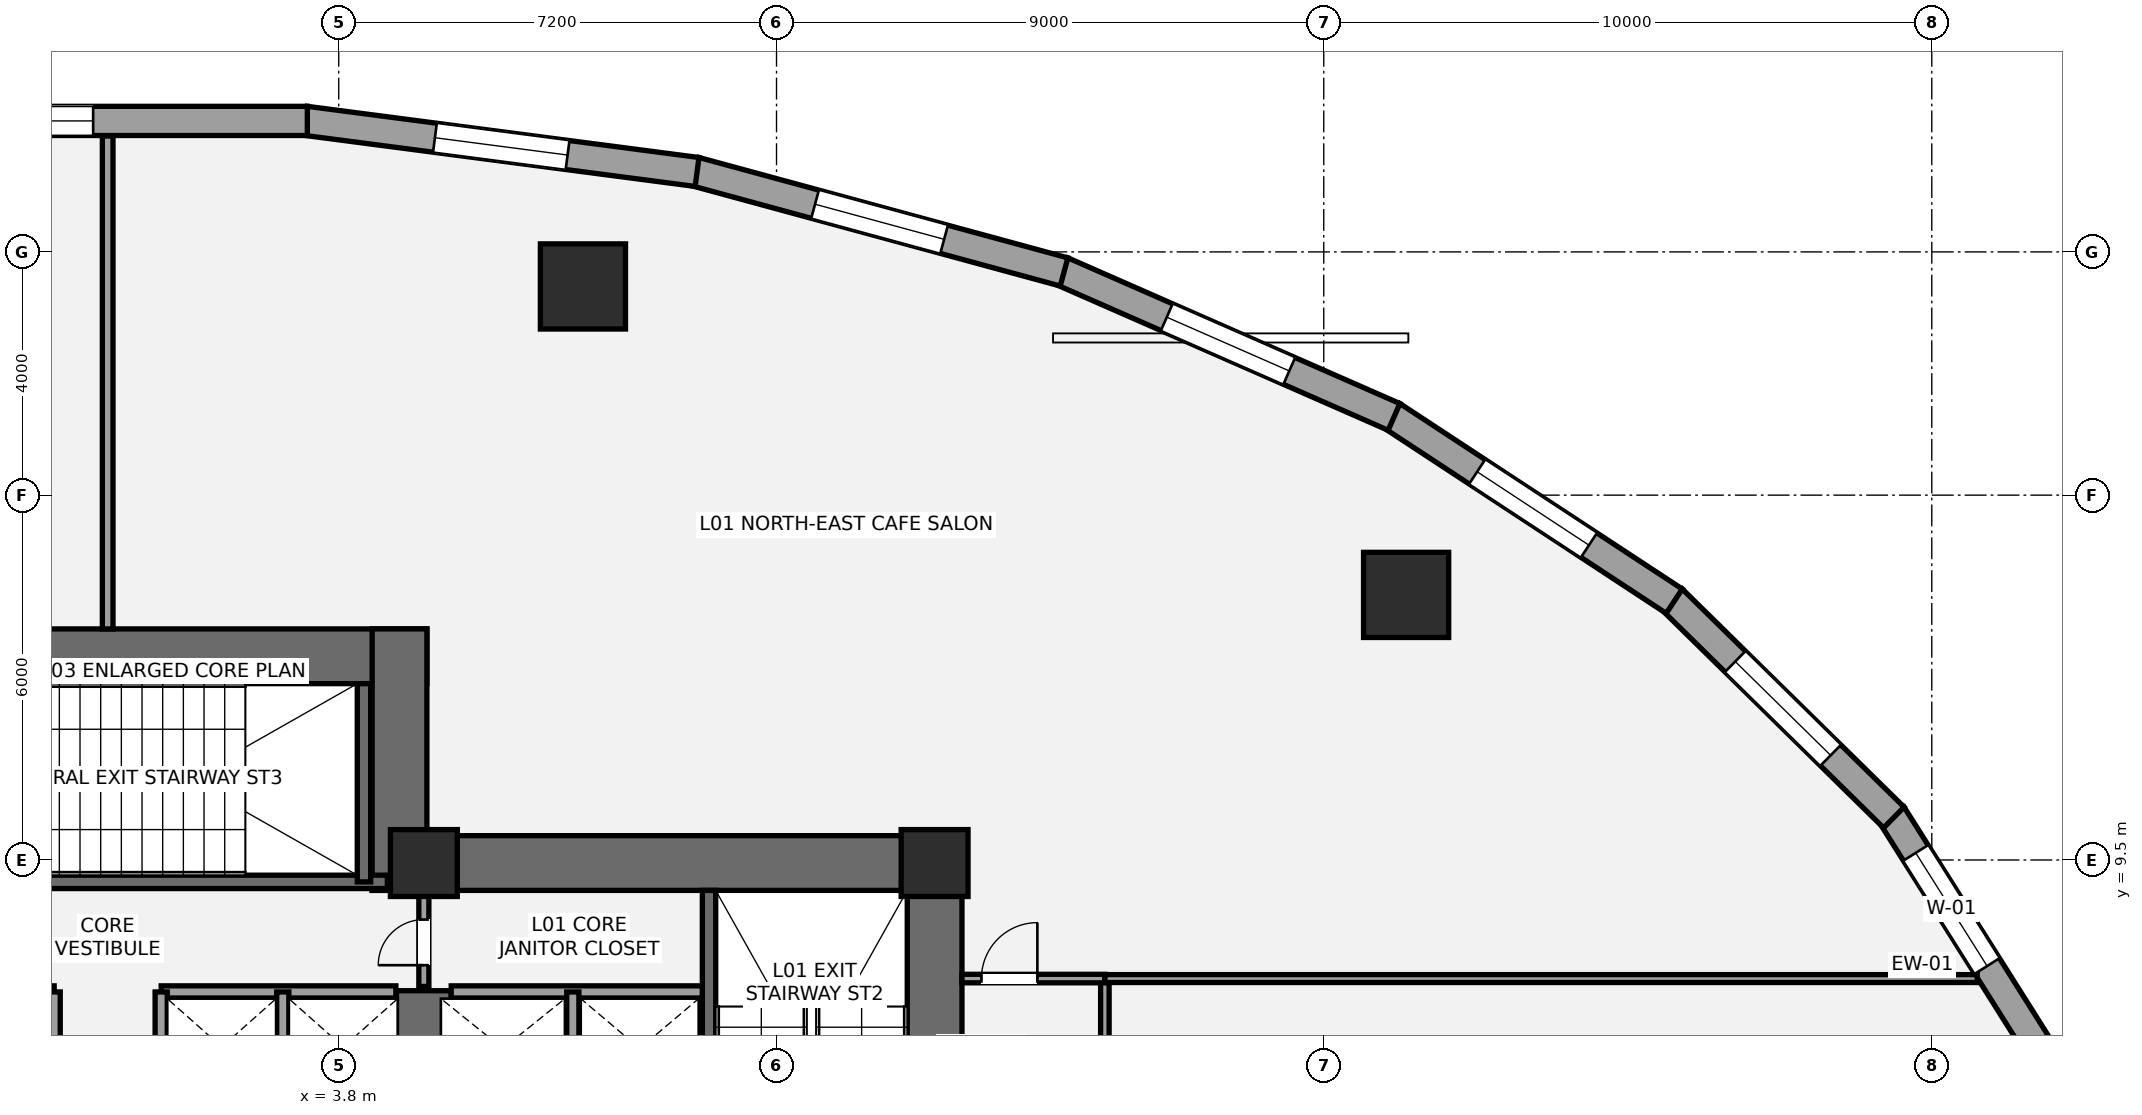
"""IFC4 building model, lengths in metres.
Left out: names, types, materials, properties, quantities, classifications, styles, units other than length and angle.
Written with IfcOpenShell. Run it as: python <this file> out.ifc"""

import sys

from ifc_helpers import new_model, si_unit, direction, frame, frame_2d, origin, origin_2d, place, context, subcontext, project, spatial, rectangle, hollow_circle, extrude, element, fill, save


model = new_model("IFC4")
c1 = context("Model", 3, precision=1e-05, world=origin(), true_north=direction((0.0, 1.0)))
c2 = subcontext(c1, "Body", "Model", "MODEL_VIEW")
j1 = project(units=[si_unit("LENGTHUNIT", "METRE"), si_unit("PLANEANGLEUNIT", "RADIAN")], contexts=[c1])
p1 = place(None, origin())
s1 = spatial("IfcSite", under=j1, at=p1, CompositionType="ELEMENT")
p2 = place(p1, origin())
s2 = spatial("IfcBuilding", under=s1, at=p2, CompositionType="ELEMENT")
p3 = place(p2, frame((0.0, 0.0, 6.0)))
s3 = spatial("IfcBuildingStorey", under=s2, at=p3, CompositionType="ELEMENT", Elevation=6.0)
p4 = place(p3, frame((13.6, 0.95, 0.0), z_axis=(0.0, 0.0, 1.0), x_axis=(0.0, 1.0, 0.0)))
e1 = element("IfcWall", 1, at=p4, inside=s3, PredefinedType="SHEAR", context=c2, shape_type="SweptSolid", body=[
    extrude(rectangle(XDim=8.95, YDim=0.9, at=frame_2d((4.475, 0.0))), origin(), (0.0, 0.0, 1.0), 4.2),
])
p5 = place(p3, frame((4.35, 9.45, 0.0), z_axis=(0.0, 0.0, 1.0), x_axis=(1.0, 0.0, 0.0)))
e2 = element("IfcWall", 2, at=p5, inside=s3, PredefinedType="SHEAR", context=c2, shape_type="SweptSolid", body=[
    extrude(rectangle(XDim=9.7, YDim=0.9, at=frame_2d((4.85, 0.0))), origin(), (0.0, 0.0, 1.0), 4.2),
])
p6 = place(p3, frame((5.2, 5.35, 0.0), z_axis=(0.0, 0.0, 1.0), x_axis=(0.0, 1.0, 0.0)))
e3 = element("IfcWall", 3, at=p6, inside=s3, PredefinedType="SHEAR", context=c2, shape_type="SweptSolid", body=[
    extrude(rectangle(XDim=2.0, YDim=0.9, at=frame_2d((1.0, 0.0))), origin(), (0.0, 0.0, 1.0), 4.2),
])
p7 = place(p3, frame((9.89, 1.85, 0.0), z_axis=(0.0, 0.0, 1.0), x_axis=(0.0, 1.0, 0.0)))
e4 = element("IfcWall", 4, at=p7, inside=s3, PredefinedType="SHEAR", context=c2, shape_type="SweptSolid", body=[
    extrude(rectangle(XDim=7.15, YDim=0.22, at=frame_2d((3.575, 0.0))), origin(), (0.0, 0.0, 1.0), 4.2),
])
p8 = place(p3, frame((-5.25, 12.85, 0.0), z_axis=(0.0, 0.0, 1.0), x_axis=(1.0, 0.0, 0.0)))
e5 = element("IfcWall", 5, at=p8, inside=s3, PredefinedType="SHEAR", context=c2, shape_type="SweptSolid", body=[
    extrude(rectangle(XDim=10.5, YDim=0.9, at=frame_2d((5.25, 0.0))), origin(), (0.0, 0.0, 1.0), 4.2),
])
p9 = place(p3, frame((4.8, 9.0, 0.0), z_axis=(0.0, 0.0, 1.0), x_axis=(0.0, 1.0, 0.0)))
e6 = element("IfcWall", 6, at=p9, inside=s3, PredefinedType="SHEAR", context=c2, shape_type="SweptSolid", body=[
    extrude(rectangle(XDim=4.3, YDim=0.9, at=frame_2d((2.15, 0.0))), origin(), (0.0, 0.0, 1.0), 4.2),
])
p10 = place(p3, frame((-4.7, 9.14, 0.0), z_axis=(0.0, 0.0, 1.0), x_axis=(1.0, 0.0, 0.0)))
e7 = element("IfcWall", 7, at=p10, inside=s3, PredefinedType="SHEAR", context=c2, shape_type="SweptSolid", body=[
    extrude(rectangle(XDim=9.3, YDim=0.22, at=frame_2d((4.65, 0.0))), origin(), (0.0, 0.0, 1.0), 4.2),
])
p11 = place(p10, frame((1.15, 0.0, 0.0)))
e8 = element("IfcOpeningElement", 8, at=p11, cuts=e7, PredefinedType="OPENING", context=c2, shape_type="SweptSolid", body=[
    extrude(rectangle(XDim=1.05, YDim=2.15, at=frame_2d((0.525, 1.075))), frame((0.0, 0.12, 0.0), z_axis=(0.0, -1.0, 0.0), x_axis=(1.0, 0.0, 0.0)), (0.0, 0.0, 1.0), 0.24),
])
p12 = place(p3, frame((4.215, 9.14, 0.0), z_axis=(0.0, 0.0, 1.0), x_axis=(0.0, 1.0, 0.0)))
e9 = element("IfcWall", 9, at=p12, inside=s3, PredefinedType="SHEAR", context=c2, shape_type="SweptSolid", body=[
    extrude(rectangle(XDim=3.26, YDim=0.22, at=frame_2d((1.63, 0.0))), origin(), (0.0, 0.0, 1.0), 4.2),
])
for number, where, z_axis, x_axis in (
    (10, (5.2, 9.45, 0.0), (0.0, 0.0, 1.0), (1.0, 0.0, 0.0)),
    (11, (13.6, 9.45, 0.0), (0.0, 0.0, 1.0), (1.0, 0.0, 0.0)),
):
    element("IfcColumn", number, at=place(p3, frame(where, z_axis=z_axis, x_axis=x_axis)), inside=s3, PredefinedType="COLUMN", context=c2, shape_type="SweptSolid", body=[
        extrude(rectangle(XDim=1.1, YDim=1.1, at=origin_2d()), origin(), (0.0, 0.0, 1.0), 4.2),
    ])
for number, where, z_axis, x_axis in (
    (12, (21.354, 13.859, 0.0), (0.0, 0.0, 1.0), (1.0, 0.0, 0.0)),
    (13, (7.816, 18.932, 0.0), (0.0, 0.0, 1.0), (1.0, 0.0, 0.0)),
):
    element("IfcColumn", number, at=place(p3, frame(where, z_axis=z_axis, x_axis=x_axis)), inside=s3, PredefinedType="USERDEFINED", context=c2, shape_type="SweptSolid", body=[
        extrude(hollow_circle(Radius=0.7, WallThickness=0.05, at=origin_2d()), origin(), (0.0, 0.0, 1.0), 4.2),
    ])
p13 = place(p3, frame((29.341, 10.243, 0.0), z_axis=(0.0, 0.0, 1.0), x_axis=(0.53349762721, -0.845801561693, 0.0)))
e14 = element("IfcWall", 14, at=p13, inside=s3, PredefinedType="STANDARD", context=c2, shape_type="SweptSolid", body=[
    extrude(rectangle(XDim=4.711, YDim=0.48, at=frame_2d((2.355, 0.0))), origin(), (0.0, 0.0, 1.0), 3.109),
])
p14 = place(p13, frame((0.74, 0.0, 0.7)))
e15 = element("IfcOpeningElement", 15, at=p14, cuts=e14, PredefinedType="OPENING", context=c2, shape_type="SweptSolid", body=[
    extrude(rectangle(XDim=2.2, YDim=1.95, at=frame_2d((1.1, 0.975))), frame((0.0, 0.25, 0.0), z_axis=(0.0, -1.0, 0.0), x_axis=(1.0, 0.0, 0.0)), (0.0, 0.0, 1.0), 0.5),
])
p15 = place(p3, frame((25.728, 13.785, 0.0), z_axis=(0.0, 0.0, 1.0), x_axis=(0.713189080178, -0.700971708355, 0.0)))
e16 = element("IfcWall", 16, at=p15, inside=s3, PredefinedType="STANDARD", context=c2, shape_type="SweptSolid", body=[
    extrude(rectangle(XDim=5.116, YDim=0.48, at=frame_2d((2.558, 0.0))), origin(), (0.0, 0.0, 1.0), 3.109),
])
p16 = place(p15, frame((1.458, 0.0, 0.7)))
e17 = element("IfcOpeningElement", 17, at=p16, cuts=e16, PredefinedType="OPENING", context=c2, shape_type="SweptSolid", body=[
    extrude(rectangle(XDim=2.2, YDim=1.95, at=frame_2d((1.1, 0.975))), frame((0.0, 0.25, 0.0), z_axis=(0.0, -1.0, 0.0), x_axis=(1.0, 0.0, 0.0)), (0.0, 0.0, 1.0), 0.5),
])
p17 = place(p3, frame((21.121, 16.806, 0.0), z_axis=(0.0, 0.0, 1.0), x_axis=(0.835863918172, -0.548936708827, 0.0)))
e18 = element("IfcWall", 18, at=p17, inside=s3, PredefinedType="STANDARD", context=c2, shape_type="SweptSolid", body=[
    extrude(rectangle(XDim=5.555, YDim=0.48, at=frame_2d((2.778, 0.0))), origin(), (0.0, 0.0, 1.0), 3.109),
])
p18 = place(p17, frame((1.678, 0.0, 0.7)))
e19 = element("IfcOpeningElement", 19, at=p18, cuts=e18, PredefinedType="OPENING", context=c2, shape_type="SweptSolid", body=[
    extrude(rectangle(XDim=2.2, YDim=1.95, at=frame_2d((1.1, 0.975))), frame((0.0, 0.25, 0.0), z_axis=(0.0, -1.0, 0.0), x_axis=(1.0, 0.0, 0.0)), (0.0, 0.0, 1.0), 0.5),
])
p19 = place(p3, frame((15.695, 19.183, 0.0), z_axis=(0.0, 0.0, 1.0), x_axis=(0.91570760638, -0.401845218484, 0.0)))
e20 = element("IfcWall", 20, at=p19, inside=s3, PredefinedType="STANDARD", context=c2, shape_type="SweptSolid", body=[
    extrude(rectangle(XDim=5.963, YDim=0.48, at=frame_2d((2.981, 0.0))), origin(), (0.0, 0.0, 1.0), 3.109),
])
p20 = place(p19, frame((1.882, 0.0, 0.7)))
e21 = element("IfcOpeningElement", 21, at=p20, cuts=e20, PredefinedType="OPENING", context=c2, shape_type="SweptSolid", body=[
    extrude(rectangle(XDim=2.2, YDim=1.95, at=frame_2d((1.1, 0.975))), frame((0.0, 0.25, 0.0), z_axis=(0.0, -1.0, 0.0), x_axis=(1.0, 0.0, 0.0)), (0.0, 0.0, 1.0), 0.5),
])
p21 = place(p3, frame((9.662, 20.821, 0.0), z_axis=(0.0, 0.0, 1.0), x_axis=(0.964936550718, -0.262483243445, 0.0)))
e22 = element("IfcWall", 22, at=p21, inside=s3, PredefinedType="STANDARD", context=c2, shape_type="SweptSolid", body=[
    extrude(rectangle(XDim=6.288, YDim=0.48, at=frame_2d((3.144, 0.0))), origin(), (0.0, 0.0, 1.0), 3.109),
])
p22 = place(p21, frame((2.044, 0.0, 0.7)))
e23 = element("IfcOpeningElement", 23, at=p22, cuts=e22, PredefinedType="OPENING", context=c2, shape_type="SweptSolid", body=[
    extrude(rectangle(XDim=2.2, YDim=1.95, at=frame_2d((1.1, 0.975))), frame((0.0, 0.25, 0.0), z_axis=(0.0, -1.0, 0.0), x_axis=(1.0, 0.0, 0.0)), (0.0, 0.0, 1.0), 0.5),
])
p23 = place(p3, frame((3.252, 21.656, 0.0), z_axis=(0.0, 0.0, 1.0), x_axis=(0.991576921472, -0.129519144545, 0.0)))
e24 = element("IfcWall", 24, at=p23, inside=s3, PredefinedType="STANDARD", context=c2, shape_type="SweptSolid", body=[
    extrude(rectangle(XDim=6.496, YDim=0.48, at=frame_2d((3.248, 0.0))), origin(), (0.0, 0.0, 1.0), 3.109),
])
p24 = place(p23, frame((2.148, 0.0, 0.7)))
e25 = element("IfcOpeningElement", 25, at=p24, cuts=e24, PredefinedType="OPENING", context=c2, shape_type="SweptSolid", body=[
    extrude(rectangle(XDim=2.2, YDim=1.95, at=frame_2d((1.1, 0.975))), frame((0.0, 0.25, 0.0), z_axis=(0.0, -1.0, 0.0), x_axis=(1.0, 0.0, 0.0)), (0.0, 0.0, 1.0), 0.5),
])
p25 = place(p3, frame((-3.284, 21.654, 0.0), z_axis=(0.0, 0.0, 1.0), x_axis=(1.0, 0.0, 0.0)))
e26 = element("IfcWall", 26, at=p25, inside=s3, PredefinedType="STANDARD", context=c2, shape_type="SweptSolid", body=[
    extrude(rectangle(XDim=6.567, YDim=0.48, at=frame_2d((3.284, 0.0))), origin(), (0.0, 0.0, 1.0), 3.109),
])
p26 = place(p25, frame((0.845, 0.0, 0.7)))
e27 = element("IfcOpeningElement", 27, at=p26, cuts=e26, PredefinedType="OPENING", context=c2, shape_type="SweptSolid", body=[
    extrude(rectangle(XDim=2.2, YDim=1.95, at=frame_2d((1.1, 0.975))), frame((0.0, 0.25, 0.0), z_axis=(0.0, -1.0, 0.0), x_axis=(1.0, 0.0, 0.0)), (0.0, 0.0, 1.0), 0.5),
])
p27 = place(p3, frame((5.65, 7.33, 0.0), z_axis=(0.0, 0.0, 1.0), x_axis=(1.0, 0.0, 0.0)))
e28 = element("IfcWall", 28, at=p27, inside=s3, PredefinedType="SOLIDWALL", context=c2, shape_type="SweptSolid", body=[
    extrude(rectangle(XDim=4.13, YDim=0.2, at=frame_2d((2.065, 0.0))), origin(), (0.0, 0.0, 1.0), 3.98),
])
p28 = place(p3, frame((7.65, 5.47, 0.0), z_axis=(0.0, 0.0, 1.0), x_axis=(0.0, 1.0, 0.0)))
e29 = element("IfcWall", 29, at=p28, inside=s3, PredefinedType="SOLIDWALL", context=c2, shape_type="SweptSolid", body=[
    extrude(rectangle(XDim=1.86, YDim=0.2, at=frame_2d((0.93, 0.0))), origin(), (0.0, 0.0, 1.0), 3.98),
])
for number, where, z_axis, x_axis in (
    (30, (-4.74, 7.33, 0.0), (0.0, 0.0, 1.0), (1.0, 0.0, 0.0)),
    (31, (0.88, 7.33, 0.0), (0.0, 0.0, 1.0), (1.0, 0.0, 0.0)),
):
    element("IfcWall", number, at=place(p3, frame(where, z_axis=z_axis, x_axis=x_axis)), inside=s3, PredefinedType="SOLIDWALL", context=c2, shape_type="SweptSolid", body=[
        extrude(rectangle(XDim=3.86, YDim=0.2, at=frame_2d((1.93, 0.0))), origin(), (0.0, 0.0, 1.0), 3.98),
    ])
for number, where, z_axis, x_axis in (
    (32, (2.88, 5.52, 0.0), (0.0, 0.0, 1.0), (0.0, 1.0, 0.0)),
    (33, (-0.88, 5.52, 0.0), (0.0, 0.0, 1.0), (0.0, 1.0, 0.0)),
    (34, (0.88, 5.52, 0.0), (0.0, 0.0, 1.0), (0.0, 1.0, 0.0)),
):
    element("IfcWall", number, at=place(p3, frame(where, z_axis=z_axis, x_axis=x_axis)), inside=s3, PredefinedType="SOLIDWALL", context=c2, shape_type="SweptSolid", body=[
        extrude(rectangle(XDim=1.81, YDim=0.2, at=frame_2d((0.905, 0.0))), origin(), (0.0, 0.0, 1.0), 3.98),
    ])
p29 = place(p3, frame((5.2, 7.42, 0.0), z_axis=(0.0, 0.0, 1.0), x_axis=(0.0, 1.0, 0.0)))
e35 = element("IfcWall", 35, at=p29, inside=s3, PredefinedType="PARTITIONING", context=c2, shape_type="SweptSolid", body=[
    extrude(rectangle(XDim=1.58, YDim=0.165, at=frame_2d((0.79, 0.0))), origin(), (0.0, 0.0, 1.0), 3.98),
])
p30 = place(p29, frame((0.35, 0.0, 0.0)))
e36 = element("IfcOpeningElement", 36, at=p30, cuts=e35, PredefinedType="OPENING", context=c2, shape_type="SweptSolid", body=[
    extrude(rectangle(XDim=0.75, YDim=2.1, at=frame_2d((0.375, 1.05))), frame((0.0, 0.093, 0.0), z_axis=(0.0, -1.0, 0.0), x_axis=(1.0, 0.0, 0.0)), (0.0, 0.0, 1.0), 0.185),
])
p31 = place(p3, frame((16.4, -18.603, 0.0), z_axis=(0.0, 0.0, 1.0), x_axis=(0.0, 1.0, 0.0)))
e37 = element("IfcWall", 37, at=p31, inside=s3, PredefinedType="PARTITIONING", context=c2, shape_type="SweptSolid", body=[
    extrude(rectangle(XDim=26.153, YDim=0.14, at=frame_2d((13.076, 0.0))), origin(), (0.0, 0.0, 1.0), 3.348),
])
p32 = place(p31, frame((14.802, 0.0, 0.0)))
e38 = element("IfcOpeningElement", 38, at=p32, cuts=e37, PredefinedType="OPENING", context=c2, shape_type="SweptSolid", body=[
    extrude(rectangle(XDim=0.9, YDim=2.1, at=frame_2d((0.45, 1.05))), frame((0.0, 0.08, 0.0), z_axis=(0.0, -1.0, 0.0), x_axis=(1.0, 0.0, 0.0)), (0.0, 0.0, 1.0), 0.16),
])
p33 = place(p31, frame((19.552, 0.0, 0.0)))
e39 = element("IfcOpeningElement", 39, at=p33, cuts=e37, PredefinedType="OPENING", context=c2, shape_type="SweptSolid", body=[
    extrude(rectangle(XDim=0.9, YDim=2.1, at=frame_2d((0.45, 1.05))), frame((0.0, 0.08, 0.0), z_axis=(0.0, -1.0, 0.0), x_axis=(1.0, 0.0, 0.0)), (0.0, 0.0, 1.0), 0.16),
])
p34 = place(p31, frame((23.827, 0.0, 0.0)))
e40 = element("IfcOpeningElement", 40, at=p34, cuts=e37, PredefinedType="OPENING", context=c2, shape_type="SweptSolid", body=[
    extrude(rectangle(XDim=0.9, YDim=2.1, at=frame_2d((0.45, 1.05))), frame((0.0, 0.08, 0.0), z_axis=(0.0, -1.0, 0.0), x_axis=(1.0, 0.0, 0.0)), (0.0, 0.0, 1.0), 0.16),
])
p35 = place(p3, frame((14.05, 7.55, 0.0), z_axis=(0.0, 0.0, 1.0), x_axis=(1.0, 0.0, 0.0)))
e41 = element("IfcWall", 41, at=p35, inside=s3, PredefinedType="PARTITIONING", context=c2, shape_type="SweptSolid", body=[
    extrude(rectangle(XDim=2.35, YDim=0.14, at=frame_2d((1.175, 0.0))), origin(), (0.0, 0.0, 1.0), 3.433),
])
p36 = place(p35, frame((0.32, 0.0, 0.0)))
e42 = element("IfcOpeningElement", 42, at=p36, cuts=e41, PredefinedType="OPENING", context=c2, shape_type="SweptSolid", body=[
    extrude(rectangle(XDim=0.92, YDim=2.15, at=frame_2d((0.46, 1.075))), frame((0.0, 0.08, 0.0), z_axis=(0.0, -1.0, 0.0), x_axis=(1.0, 0.0, 0.0)), (0.0, 0.0, 1.0), 0.16),
])
p37 = place(p3, frame((0.0, 13.3, 0.0), z_axis=(0.0, 0.0, 1.0), x_axis=(0.0, 1.0, 0.0)))
e43 = element("IfcWall", 43, at=p37, inside=s3, PredefinedType="PARTITIONING", context=c2, shape_type="SweptSolid", body=[
    extrude(rectangle(XDim=8.106, YDim=0.175, at=frame_2d((4.053, 0.0))), origin(), (0.0, 0.0, 1.0), 3.98),
])
p38 = place(p3, frame((16.4, 7.55, 0.0), z_axis=(0.0, 0.0, 1.0), x_axis=(1.0, 0.0, 0.0)))
e44 = element("IfcWall", 44, at=p38, inside=s3, PredefinedType="PARTITIONING", context=c2, shape_type="SweptSolid", body=[
    extrude(rectangle(XDim=14.347, YDim=0.13, at=frame_2d((7.173, 0.0))), origin(), (0.0, 0.0, 1.0), 2.958),
])
p39 = place(p14, origin())
e45 = element("IfcWindow", 45, at=p39, inside=s3, PartitioningType="SINGLE_PANEL", PredefinedType="WINDOW", context=c2, shape_type="SweptSolid", body=[
    extrude(rectangle(XDim=2.2, YDim=1.95, at=frame_2d((1.1, 0.975))), frame((0.0, -0.01, 0.0), z_axis=(0.0, -1.0, 0.0), x_axis=(1.0, 0.0, 0.0)), (0.0, 0.0, 1.0), 0.06),
])
fill(e15, e45)
p40 = place(p16, origin())
e46 = element("IfcWindow", 46, at=p40, inside=s3, PartitioningType="SINGLE_PANEL", PredefinedType="WINDOW", context=c2, shape_type="SweptSolid", body=[
    extrude(rectangle(XDim=2.2, YDim=1.95, at=frame_2d((1.1, 0.975))), frame((0.0, -0.01, 0.0), z_axis=(0.0, -1.0, 0.0), x_axis=(1.0, 0.0, 0.0)), (0.0, 0.0, 1.0), 0.06),
])
fill(e17, e46)
p41 = place(p18, origin())
e47 = element("IfcWindow", 47, at=p41, inside=s3, PartitioningType="SINGLE_PANEL", PredefinedType="WINDOW", context=c2, shape_type="SweptSolid", body=[
    extrude(rectangle(XDim=2.2, YDim=1.95, at=frame_2d((1.1, 0.975))), frame((0.0, -0.01, 0.0), z_axis=(0.0, -1.0, 0.0), x_axis=(1.0, 0.0, 0.0)), (0.0, 0.0, 1.0), 0.06),
])
fill(e19, e47)
p42 = place(p20, origin())
e48 = element("IfcWindow", 48, at=p42, inside=s3, PartitioningType="SINGLE_PANEL", PredefinedType="WINDOW", context=c2, shape_type="SweptSolid", body=[
    extrude(rectangle(XDim=2.2, YDim=1.95, at=frame_2d((1.1, 0.975))), frame((0.0, -0.01, 0.0), z_axis=(0.0, -1.0, 0.0), x_axis=(1.0, 0.0, 0.0)), (0.0, 0.0, 1.0), 0.06),
])
fill(e21, e48)
p43 = place(p22, origin())
e49 = element("IfcWindow", 49, at=p43, inside=s3, PartitioningType="SINGLE_PANEL", PredefinedType="WINDOW", context=c2, shape_type="SweptSolid", body=[
    extrude(rectangle(XDim=2.2, YDim=1.95, at=frame_2d((1.1, 0.975))), frame((0.0, -0.01, 0.0), z_axis=(0.0, -1.0, 0.0), x_axis=(1.0, 0.0, 0.0)), (0.0, 0.0, 1.0), 0.06),
])
fill(e23, e49)
p44 = place(p24, origin())
e50 = element("IfcWindow", 50, at=p44, inside=s3, PartitioningType="SINGLE_PANEL", PredefinedType="WINDOW", context=c2, shape_type="SweptSolid", body=[
    extrude(rectangle(XDim=2.2, YDim=1.95, at=frame_2d((1.1, 0.975))), frame((0.0, -0.01, 0.0), z_axis=(0.0, -1.0, 0.0), x_axis=(1.0, 0.0, 0.0)), (0.0, 0.0, 1.0), 0.06),
])
fill(e25, e50)
p45 = place(p26, origin())
e51 = element("IfcWindow", 51, at=p45, inside=s3, PartitioningType="SINGLE_PANEL", PredefinedType="WINDOW", context=c2, shape_type="SweptSolid", body=[
    extrude(rectangle(XDim=2.2, YDim=1.95, at=frame_2d((1.1, 0.975))), frame((0.0, -0.01, 0.0), z_axis=(0.0, -1.0, 0.0), x_axis=(1.0, 0.0, 0.0)), (0.0, 0.0, 1.0), 0.06),
])
fill(e27, e51)
p46 = place(p30, origin())
e52 = element("IfcDoor", 52, at=p46, inside=s3, OperationType="SINGLE_SWING_LEFT", PredefinedType="DOOR", context=c2, shape_type="SweptSolid", body=[
    extrude(rectangle(XDim=0.75, YDim=2.1, at=frame_2d((0.375, 1.05))), frame((0.0, 0.025, 0.0), z_axis=(0.0, -1.0, 0.0), x_axis=(1.0, 0.0, 0.0)), (0.0, 0.0, 1.0), 0.05),
])
fill(e36, e52)
p47 = place(p36, origin())
e53 = element("IfcDoor", 53, at=p47, inside=s3, OperationType="SINGLE_SWING_RIGHT", PredefinedType="DOOR", context=c2, shape_type="SweptSolid", body=[
    extrude(rectangle(XDim=0.92, YDim=2.15, at=frame_2d((0.46, 1.075))), frame((0.0, 0.025, 0.0), z_axis=(0.0, -1.0, 0.0), x_axis=(1.0, 0.0, 0.0)), (0.0, 0.0, 1.0), 0.05),
])
fill(e42, e53)
save(model, sys.argv[1])
